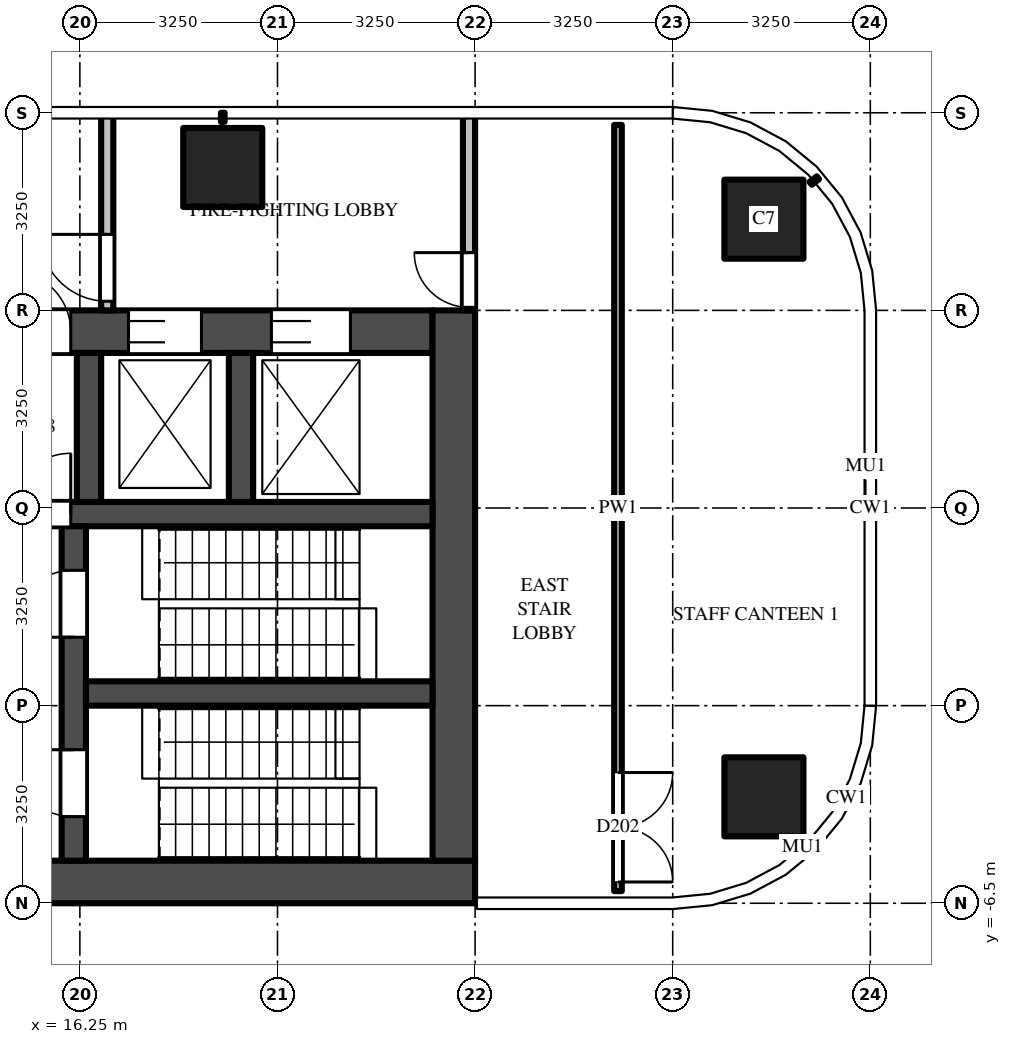
"""IFC4 building model, lengths in metres.
Left out: names, types, materials, properties, quantities, classifications, styles, units other than length and angle.
Written with IfcOpenShell. Run it as: python <this file> out.ifc"""

import sys

from ifc_helpers import new_model, si_unit, direction, frame, frame_2d, origin, origin_2d, place, context, subcontext, project, spatial, rectangle, extrude, source, transform, mapped, element, fill, save


model = new_model("IFC4")
c1 = context("Model", 3, precision=1e-05, world=origin(), true_north=direction((0.0, 1.0)))
c2 = subcontext(c1, "Body", "Model", "MODEL_VIEW")
j1 = project(units=[si_unit("LENGTHUNIT", "METRE"), si_unit("PLANEANGLEUNIT", "RADIAN")], contexts=[c1])
p1 = place(None, origin())
s1 = spatial("IfcSite", under=j1, at=p1, CompositionType="ELEMENT")
p2 = place(p1, origin())
s2 = spatial("IfcBuilding", under=s1, at=p2, CompositionType="ELEMENT")
p3 = place(p2, frame((0.0, 0.0, 111.0)))
s3 = spatial("IfcBuildingStorey", under=s2, at=p3, CompositionType="ELEMENT", Elevation=111.0)
m1 = source(origin(), c2, "Body", "SweptSolid", [
    extrude(rectangle(XDim=1.3, YDim=1.3, at=origin_2d()), origin(), (0.0, 0.0, 1.0), 4.5),
])
for number, where, z_axis, x_axis in (
    (1, (18.6, 5.6, 0.0), (0.0, 0.0, 1.0), (1.0, 0.0, 0.0)),
    (2, (27.5, 4.75, 0.0), (0.0, 0.0, 1.0), (1.0, 0.0, 0.0)),
    (3, (27.5, -4.75, 0.0), (0.0, 0.0, 1.0), (1.0, 0.0, 0.0)),
):
    element("IfcColumn", number, at=place(p3, frame(where, z_axis=z_axis, x_axis=x_axis)), inside=s3, PredefinedType="COLUMN", context=c2, shape_type="MappedRepresentation", body=[
        mapped(m1, transform((0.0, 0.0, 0.0))),
    ])
m2 = source(origin(), c2, "Body", "SweptSolid", [
    extrude(rectangle(XDim=16.5, YDim=0.7, at=frame_2d((8.25, 0.0))), origin(), (0.0, 0.0, 1.0), 4.25),
])
p4 = place(p3, frame((6.25, -6.15, 0.0), z_axis=(0.0, 0.0, 1.0), x_axis=(1.0, 0.0, 0.0)))
e4 = element("IfcWall", 4, at=p4, inside=s3, PredefinedType="SHEAR", context=c2, shape_type="MappedRepresentation", body=[
    mapped(m2, transform((0.0, 0.0, 0.0))),
])
m3 = source(origin(), c2, "Body", "SweptSolid", [
    extrude(rectangle(XDim=14.85, YDim=0.7, at=frame_2d((7.425, 0.0))), origin(), (0.0, 0.0, 1.0), 4.25),
])
p5 = place(p3, frame((7.2, 2.9, 0.0), z_axis=(0.0, 0.0, 1.0), x_axis=(1.0, 0.0, 0.0)))
e5 = element("IfcWall", 5, at=p5, inside=s3, PredefinedType="SHEAR", context=c2, shape_type="MappedRepresentation", body=[
    mapped(m3, transform((0.0, 0.0, 0.0))),
])
m4 = source(origin(), c2, "Body", "SweptSolid", [
    extrude(rectangle(XDim=1.3, YDim=2.1, at=frame_2d((0.65, 1.05))), frame((0.0, 0.36, 0.0), z_axis=(0.0, -1.0, 0.0), x_axis=(1.0, 0.0, 0.0)), (0.0, 0.0, 1.0), 0.72),
])
p6 = place(p5, frame((12.2, 0.0, 0.0)))
e6 = element("IfcOpeningElement", 6, at=p6, cuts=e5, PredefinedType="OPENING", context=c2, shape_type="MappedRepresentation", body=[
    mapped(m4, transform((0.0, 0.0, 0.0))),
])
m5 = source(origin(), c2, "Body", "SweptSolid", [
    extrude(rectangle(XDim=1.2, YDim=2.1, at=frame_2d((0.6, 1.05))), frame((0.0, 0.36, 0.0), z_axis=(0.0, -1.0, 0.0), x_axis=(1.0, 0.0, 0.0)), (0.0, 0.0, 1.0), 0.72),
])
p7 = place(p5, frame((9.85, 0.0, 0.0)))
e7 = element("IfcOpeningElement", 7, at=p7, cuts=e5, PredefinedType="OPENING", context=c2, shape_type="MappedRepresentation", body=[
    mapped(m5, transform((0.0, 0.0, 0.0))),
])
m6 = source(origin(), c2, "Body", "SweptSolid", [
    extrude(rectangle(XDim=1.0, YDim=2.1, at=frame_2d((0.5, 1.05))), frame((0.0, 0.36, 0.0), z_axis=(0.0, -1.0, 0.0), x_axis=(1.0, 0.0, 0.0)), (0.0, 0.0, 1.0), 0.72),
])
p8 = place(p5, frame((7.9, 0.0, 0.0)))
e8 = element("IfcOpeningElement", 8, at=p8, cuts=e5, PredefinedType="OPENING", context=c2, shape_type="MappedRepresentation", body=[
    mapped(m6, transform((0.0, 0.0, 0.0))),
])
m7 = source(origin(), c2, "Body", "SweptSolid", [
    extrude(rectangle(XDim=0.8, YDim=2.1, at=frame_2d((0.4, 1.05))), frame((0.0, 0.36, 0.0), z_axis=(0.0, -1.0, 0.0), x_axis=(1.0, 0.0, 0.0)), (0.0, 0.0, 1.0), 0.72),
])
p9 = place(p5, frame((0.113, 0.0, 0.0)))
e9 = element("IfcOpeningElement", 9, at=p9, cuts=e5, PredefinedType="OPENING", context=c2, shape_type="MappedRepresentation", body=[
    mapped(m7, transform((0.0, 0.0, 0.0))),
])
p10 = place(p5, frame((1.288, 0.0, 0.0)))
e10 = element("IfcOpeningElement", 10, at=p10, cuts=e5, PredefinedType="OPENING", context=c2, shape_type="MappedRepresentation", body=[
    mapped(m7, transform((0.0, 0.0, 0.0))),
])
p11 = place(p5, frame((2.712, 0.0, 0.0)))
e11 = element("IfcOpeningElement", 11, at=p11, cuts=e5, PredefinedType="OPENING", context=c2, shape_type="MappedRepresentation", body=[
    mapped(m7, transform((0.0, 0.0, 0.0))),
])
p12 = place(p5, frame((3.887, 0.0, 0.0)))
e12 = element("IfcOpeningElement", 12, at=p12, cuts=e5, PredefinedType="OPENING", context=c2, shape_type="MappedRepresentation", body=[
    mapped(m7, transform((0.0, 0.0, 0.0))),
])
p13 = place(p5, frame((5.312, 0.0, 0.0)))
e13 = element("IfcOpeningElement", 13, at=p13, cuts=e5, PredefinedType="OPENING", context=c2, shape_type="MappedRepresentation", body=[
    mapped(m7, transform((0.0, 0.0, 0.0))),
])
p14 = place(p5, frame((6.488, 0.0, 0.0)))
e14 = element("IfcOpeningElement", 14, at=p14, cuts=e5, PredefinedType="OPENING", context=c2, shape_type="MappedRepresentation", body=[
    mapped(m7, transform((0.0, 0.0, 0.0))),
])
m8 = source(origin(), c2, "Body", "SweptSolid", [
    extrude(rectangle(XDim=9.05, YDim=0.7, at=frame_2d((4.525, 0.0))), origin(), (0.0, 0.0, 1.0), 4.25),
])
p15 = place(p3, frame((22.4, -5.8, 0.0), z_axis=(0.0, 0.0, 1.0), x_axis=(0.0, 1.0, 0.0)))
e15 = element("IfcWall", 15, at=p15, inside=s3, PredefinedType="SHEAR", context=c2, shape_type="MappedRepresentation", body=[
    mapped(m8, transform((0.0, 0.0, 0.0))),
])
m9 = source(origin(), c2, "Body", "SweptSolid", [
    extrude(rectangle(XDim=14.85, YDim=0.4, at=frame_2d((7.425, 0.0))), origin(), (0.0, 0.0, 1.0), 4.25),
])
p16 = place(p3, frame((7.2, -0.1, 0.0), z_axis=(0.0, 0.0, 1.0), x_axis=(1.0, 0.0, 0.0)))
e16 = element("IfcWall", 16, at=p16, inside=s3, PredefinedType="SHEAR", context=c2, shape_type="MappedRepresentation", body=[
    mapped(m9, transform((0.0, 0.0, 0.0))),
])
m10 = source(origin(), c2, "Body", "SweptSolid", [
    extrude(rectangle(XDim=1.0, YDim=2.1, at=frame_2d((0.5, 1.05))), frame((0.0, 0.21, 0.0), z_axis=(0.0, -1.0, 0.0), x_axis=(1.0, 0.0, 0.0)), (0.0, 0.0, 1.0), 0.42),
])
p17 = place(p16, frame((7.9, 0.0, 0.0)))
e17 = element("IfcOpeningElement", 17, at=p17, cuts=e16, PredefinedType="OPENING", context=c2, shape_type="MappedRepresentation", body=[
    mapped(m10, transform((0.0, 0.0, 0.0))),
])
m11 = source(origin(), c2, "Body", "SweptSolid", [
    extrude(rectangle(XDim=5.5, YDim=0.4, at=frame_2d((2.75, 0.0))), origin(), (0.0, 0.0, 1.0), 4.25),
])
p18 = place(p3, frame((16.15, -5.8, 0.0), z_axis=(0.0, 0.0, 1.0), x_axis=(0.0, 1.0, 0.0)))
e18 = element("IfcWall", 18, at=p18, inside=s3, PredefinedType="SHEAR", context=c2, shape_type="MappedRepresentation", body=[
    mapped(m11, transform((0.0, 0.0, 0.0))),
])
m12 = source(origin(), c2, "Body", "SweptSolid", [
    extrude(rectangle(XDim=1.1, YDim=2.1, at=frame_2d((0.55, 1.05))), frame((0.0, 0.21, 0.0), z_axis=(0.0, -1.0, 0.0), x_axis=(1.0, 0.0, 0.0)), (0.0, 0.0, 1.0), 0.42),
])
p19 = place(p18, frame((0.725, 0.0, 0.0)))
e19 = element("IfcOpeningElement", 19, at=p19, cuts=e18, PredefinedType="OPENING", context=c2, shape_type="MappedRepresentation", body=[
    mapped(m12, transform((0.0, 0.0, 0.0))),
])
p20 = place(p18, frame((3.675, 0.0, 0.0)))
e20 = element("IfcOpeningElement", 20, at=p20, cuts=e18, PredefinedType="OPENING", context=c2, shape_type="MappedRepresentation", body=[
    mapped(m12, transform((0.0, 0.0, 0.0))),
])
m13 = source(origin(), c2, "Body", "SweptSolid", [
    extrude(rectangle(XDim=5.7, YDim=0.4, at=frame_2d((2.85, 0.0))), origin(), (0.0, 0.0, 1.0), 4.25),
])
p21 = place(p3, frame((16.35, -3.05, 0.0), z_axis=(0.0, 0.0, 1.0), x_axis=(1.0, 0.0, 0.0)))
e21 = element("IfcWall", 21, at=p21, inside=s3, PredefinedType="SHEAR", context=c2, shape_type="MappedRepresentation", body=[
    mapped(m13, transform((0.0, 0.0, 0.0))),
])
m14 = source(origin(), c2, "Body", "SweptSolid", [
    extrude(rectangle(XDim=2.45, YDim=0.4, at=frame_2d((1.225, 0.0))), origin(), (0.0, 0.0, 1.0), 4.25),
])
for number, where, z_axis, x_axis in (
    (22, (16.4, 0.1, 0.0), (0.0, 0.0, 1.0), (0.0, 1.0, 0.0)),
    (23, (18.9, 0.1, 0.0), (0.0, 0.0, 1.0), (0.0, 1.0, 0.0)),
):
    element("IfcWall", number, at=place(p3, frame(where, z_axis=z_axis, x_axis=x_axis)), inside=s3, PredefinedType="SHEAR", context=c2, shape_type="MappedRepresentation", body=[
        mapped(m14, transform((0.0, 0.0, 0.0))),
    ])
m15 = source(origin(), c2, "Body", "SweptSolid", [
    extrude(rectangle(XDim=3.25, YDim=0.2, at=frame_2d((1.625, 0.0))), origin(), (0.0, 0.0, 1.0), 4.25),
])
p22 = place(p3, frame((16.7, 3.25, 0.0), z_axis=(0.0, 0.0, 1.0), x_axis=(0.0, 1.0, 0.0)))
e24 = element("IfcWall", 24, at=p22, inside=s3, PredefinedType="PARTITIONING", context=c2, shape_type="MappedRepresentation", body=[
    mapped(m15, transform((0.0, 0.0, 0.0))),
])
m16 = source(origin(), c2, "Body", "SweptSolid", [
    extrude(rectangle(XDim=1.1, YDim=2.1, at=frame_2d((0.55, 1.05))), frame((0.0, 0.11, 0.0), z_axis=(0.0, -1.0, 0.0), x_axis=(1.0, 0.0, 0.0)), (0.0, 0.0, 1.0), 0.22),
])
p23 = place(p22, frame((0.15, 0.0, 0.0)))
e25 = element("IfcOpeningElement", 25, at=p23, cuts=e24, PredefinedType="OPENING", context=c2, shape_type="MappedRepresentation", body=[
    mapped(m16, transform((0.0, 0.0, 0.0))),
])
p24 = place(p3, frame((22.65, 3.25, 0.0), z_axis=(0.0, 0.0, 1.0), x_axis=(0.0, 1.0, 0.0)))
e26 = element("IfcWall", 26, at=p24, inside=s3, PredefinedType="PARTITIONING", context=c2, shape_type="MappedRepresentation", body=[
    mapped(m15, transform((0.0, 0.0, 0.0))),
])
m17 = source(origin(), c2, "Body", "SweptSolid", [
    extrude(rectangle(XDim=0.9, YDim=2.1, at=frame_2d((0.45, 1.05))), frame((0.0, 0.11, 0.0), z_axis=(0.0, -1.0, 0.0), x_axis=(1.0, 0.0, 0.0)), (0.0, 0.0, 1.0), 0.22),
])
p25 = place(p24, frame((0.05, 0.0, 0.0)))
e27 = element("IfcOpeningElement", 27, at=p25, cuts=e26, PredefinedType="OPENING", context=c2, shape_type="MappedRepresentation", body=[
    mapped(m17, transform((0.0, 0.0, 0.0))),
])
m18 = source(origin(), c2, "Body", "SweptSolid", [
    extrude(rectangle(XDim=12.6, YDim=0.125, at=frame_2d((6.3, 0.0))), origin(), (0.0, 0.0, 1.0), 3.33),
])
p26 = place(p3, frame((25.1, 6.3, 0.0), z_axis=(0.0, 0.0, 1.0), x_axis=(0.0, -1.0, 0.0)))
e28 = element("IfcWall", 28, at=p26, inside=s3, PredefinedType="PARTITIONING", context=c2, shape_type="MappedRepresentation", body=[
    mapped(m18, transform((0.0, 0.0, 0.0))),
])
m19 = source(origin(), c2, "Body", "SweptSolid", [
    extrude(rectangle(XDim=1.8, YDim=2.1, at=frame_2d((0.9, 1.05))), frame((0.0, 0.073, 0.0), z_axis=(0.0, -1.0, 0.0), x_axis=(1.0, 0.0, 0.0)), (0.0, 0.0, 1.0), 0.145),
])
p27 = place(p26, frame((10.65, 0.0, 0.0)))
e29 = element("IfcOpeningElement", 29, at=p27, cuts=e28, PredefinedType="OPENING", context=c2, shape_type="MappedRepresentation", body=[
    mapped(m19, transform((0.0, 0.0, 0.0))),
])
m20 = source(origin(), c2, "Body", "SweptSolid", [
    extrude(rectangle(XDim=1.3, YDim=2.1, at=frame_2d((0.65, 1.05))), frame((0.0, -0.275, 0.0), z_axis=(0.0, -1.0, 0.0), x_axis=(1.0, 0.0, 0.0)), (0.0, 0.0, 1.0), 0.05),
])
p28 = place(p6, origin())
e30 = element("IfcDoor", 30, at=p28, inside=s3, OperationType="DOUBLE_DOOR_SLIDING", PredefinedType="DOOR", context=c2, shape_type="MappedRepresentation", body=[
    mapped(m20, transform((0.0, 0.0, 0.0))),
])
fill(e6, e30)
m21 = source(origin(), c2, "Body", "SweptSolid", [
    extrude(rectangle(XDim=1.2, YDim=2.1, at=frame_2d((0.6, 1.05))), frame((0.0, -0.275, 0.0), z_axis=(0.0, -1.0, 0.0), x_axis=(1.0, 0.0, 0.0)), (0.0, 0.0, 1.0), 0.05),
])
p29 = place(p7, origin())
e31 = element("IfcDoor", 31, at=p29, inside=s3, OperationType="DOUBLE_DOOR_SLIDING", PredefinedType="DOOR", context=c2, shape_type="MappedRepresentation", body=[
    mapped(m21, transform((0.0, 0.0, 0.0))),
])
fill(e7, e31)
m22 = source(origin(), c2, "Body", "SweptSolid", [
    extrude(rectangle(XDim=1.1, YDim=2.1, at=frame_2d((0.55, 1.05))), frame((0.0, 0.025, 0.0), z_axis=(0.0, -1.0, 0.0), x_axis=(1.0, 0.0, 0.0)), (0.0, 0.0, 1.0), 0.05),
])
p30 = place(p19, origin())
e32 = element("IfcDoor", 32, at=p30, inside=s3, OperationType="SINGLE_SWING_RIGHT", PredefinedType="DOOR", context=c2, shape_type="MappedRepresentation", body=[
    mapped(m22, transform((0.0, 0.0, 0.0))),
])
fill(e19, e32)
p31 = place(p20, origin())
e33 = element("IfcDoor", 33, at=p31, inside=s3, OperationType="SINGLE_SWING_LEFT", PredefinedType="DOOR", context=c2, shape_type="MappedRepresentation", body=[
    mapped(m22, transform((0.0, 0.0, 0.0))),
])
fill(e20, e33)
m23 = source(origin(), c2, "Body", "SweptSolid", [
    extrude(rectangle(XDim=1.0, YDim=2.1, at=frame_2d((0.5, 1.05))), frame((0.0, 0.025, 0.0), z_axis=(0.0, -1.0, 0.0), x_axis=(1.0, 0.0, 0.0)), (0.0, 0.0, 1.0), 0.05),
])
p32 = place(p17, origin())
e34 = element("IfcDoor", 34, at=p32, inside=s3, OperationType="SINGLE_SWING_RIGHT", PredefinedType="DOOR", context=c2, shape_type="MappedRepresentation", body=[
    mapped(m23, transform((0.0, 0.0, 0.0))),
])
fill(e17, e34)
m24 = source(origin(), c2, "Body", "SweptSolid", [
    extrude(rectangle(XDim=1.0, YDim=2.1, at=frame_2d((0.5, 1.05))), frame((0.0, -0.275, 0.0), z_axis=(0.0, -1.0, 0.0), x_axis=(1.0, 0.0, 0.0)), (0.0, 0.0, 1.0), 0.05),
])
p33 = place(p8, origin())
e35 = element("IfcDoor", 35, at=p33, inside=s3, OperationType="SINGLE_SWING_LEFT", PredefinedType="DOOR", context=c2, shape_type="MappedRepresentation", body=[
    mapped(m24, transform((0.0, 0.0, 0.0))),
])
fill(e8, e35)
p34 = place(p23, origin())
e36 = element("IfcDoor", 36, at=p34, inside=s3, OperationType="SINGLE_SWING_RIGHT", PredefinedType="DOOR", context=c2, shape_type="MappedRepresentation", body=[
    mapped(m22, transform((0.0, 0.0, 0.0))),
])
fill(e25, e36)
m25 = source(origin(), c2, "Body", "SweptSolid", [
    extrude(rectangle(XDim=0.9, YDim=2.1, at=frame_2d((0.45, 1.05))), frame((0.0, 0.025, 0.0), z_axis=(0.0, -1.0, 0.0), x_axis=(1.0, 0.0, 0.0)), (0.0, 0.0, 1.0), 0.05),
])
p35 = place(p25, origin())
e37 = element("IfcDoor", 37, at=p35, inside=s3, OperationType="SINGLE_SWING_RIGHT", PredefinedType="DOOR", context=c2, shape_type="MappedRepresentation", body=[
    mapped(m25, transform((0.0, 0.0, 0.0))),
])
fill(e27, e37)
m26 = source(origin(), c2, "Body", "SweptSolid", [
    extrude(rectangle(XDim=1.8, YDim=2.1, at=frame_2d((0.9, 1.05))), frame((0.0, 0.025, 0.0), z_axis=(0.0, -1.0, 0.0), x_axis=(1.0, 0.0, 0.0)), (0.0, 0.0, 1.0), 0.05),
])
p36 = place(p27, origin())
e38 = element("IfcDoor", 38, at=p36, inside=s3, OperationType="DOUBLE_DOOR_SINGLE_SWING", PredefinedType="DOOR", context=c2, shape_type="MappedRepresentation", body=[
    mapped(m26, transform((0.0, 0.0, 0.0))),
])
fill(e29, e38)
save(model, sys.argv[1])
